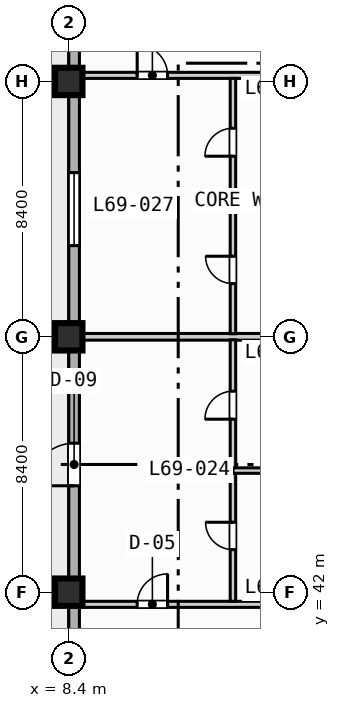
"""IFC4 building model, lengths in metres.
Left out: names, types, materials, properties, quantities, classifications, styles, units other than length and angle.
Written with IfcOpenShell. Run it as: python <this file> out.ifc"""

import sys

from ifc_helpers import new_model, si_unit, direction, frame, frame_2d, origin, origin_2d, place, context, subcontext, project, spatial, rectangle, extrude, element, fill, save


model = new_model("IFC4")
c1 = context("Model", 3, precision=1e-05, world=origin(), true_north=direction((0.0, 1.0)))
c2 = subcontext(c1, "Body", "Model", "MODEL_VIEW")
j1 = project(units=[si_unit("LENGTHUNIT", "METRE"), si_unit("PLANEANGLEUNIT", "RADIAN")], contexts=[c1])
p1 = place(None, origin())
s1 = spatial("IfcSite", under=j1, at=p1, CompositionType="ELEMENT")
p2 = place(p1, origin())
s2 = spatial("IfcBuilding", under=s1, at=p2, CompositionType="ELEMENT")
p3 = place(p2, frame((0.0, 0.0, 278.6)))
s3 = spatial("IfcBuildingStorey", under=s2, at=p3, CompositionType="ELEMENT", Elevation=278.6)
for number, where, z_axis, x_axis in (
    (1, (8.4, 42.0, 0.0), (0.0, 0.0, 1.0), (1.0, 0.0, 0.0)),
    (2, (8.4, 50.4, 0.0), (0.0, 0.0, 1.0), (1.0, 0.0, 0.0)),
    (3, (8.4, 58.8, 0.0), (0.0, 0.0, 1.0), (1.0, 0.0, 0.0)),
):
    element("IfcColumn", number, at=place(p3, frame(where, z_axis=z_axis, x_axis=x_axis)), inside=s3, PredefinedType="COLUMN", context=c2, shape_type="SweptSolid", body=[
        extrude(rectangle(XDim=0.9, YDim=0.9, at=origin_2d()), origin(), (0.0, 0.0, 1.0), 3.7),
    ])
p4 = place(p3, frame((8.575, 11.575, 0.0), z_axis=(0.0, 0.0, 1.0), x_axis=(0.0, 1.0, 0.0)))
e4 = element("IfcWall", 4, at=p4, inside=s3, PredefinedType="STANDARD", context=c2, shape_type="SweptSolid", body=[
    extrude(rectangle(XDim=60.85, YDim=0.35, at=frame_2d((30.425, 0.0))), origin(), (0.0, 0.0, 1.0), 3.47),
])
p5 = place(p4, frame((33.925, 0.0, 0.0)))
e5 = element("IfcOpeningElement", 5, at=p5, cuts=e4, PredefinedType="OPENING", context=c2, shape_type="SweptSolid", body=[
    extrude(rectangle(XDim=1.4, YDim=2.2, at=frame_2d((0.7, 1.1))), frame((0.0, 0.185, 0.0), z_axis=(0.0, -1.0, 0.0), x_axis=(1.0, 0.0, 0.0)), (0.0, 0.0, 1.0), 0.37),
])
p6 = place(p4, frame((16.925, 0.0, 0.85)))
e6 = element("IfcOpeningElement", 6, at=p6, cuts=e4, PredefinedType="OPENING", context=c2, shape_type="SweptSolid", body=[
    extrude(rectangle(XDim=1.8, YDim=1.8, at=frame_2d((0.9, 0.9))), frame((0.0, 0.185, 0.0), z_axis=(0.0, -1.0, 0.0), x_axis=(1.0, 0.0, 0.0)), (0.0, 0.0, 1.0), 0.37),
])
p7 = place(p4, frame((25.025, 0.0, 0.85)))
e7 = element("IfcOpeningElement", 7, at=p7, cuts=e4, PredefinedType="OPENING", context=c2, shape_type="SweptSolid", body=[
    extrude(rectangle(XDim=2.4, YDim=1.95, at=frame_2d((1.2, 0.975))), frame((0.0, 0.185, 0.0), z_axis=(0.0, -1.0, 0.0), x_axis=(1.0, 0.0, 0.0)), (0.0, 0.0, 1.0), 0.37),
])
p8 = place(p4, frame((41.825, 0.0, 0.85)))
e8 = element("IfcOpeningElement", 8, at=p8, cuts=e4, PredefinedType="OPENING", context=c2, shape_type="SweptSolid", body=[
    extrude(rectangle(XDim=2.4, YDim=1.95, at=frame_2d((1.2, 0.975))), frame((0.0, 0.185, 0.0), z_axis=(0.0, -1.0, 0.0), x_axis=(1.0, 0.0, 0.0)), (0.0, 0.0, 1.0), 0.37),
])
p9 = place(p3, frame((8.65, 41.6, 0.0), z_axis=(0.0, 0.0, 1.0), x_axis=(1.0, 0.0, 0.0)))
e9 = element("IfcWall", 9, at=p9, inside=s3, PredefinedType="PARTITIONING", context=c2, shape_type="SweptSolid", body=[
    extrude(rectangle(XDim=7.95, YDim=0.2, at=frame_2d((3.975, 0.0))), origin(), (0.0, 0.0, 1.0), 3.47),
])
p10 = place(p9, frame((2.0, 0.0, 0.0)))
e10 = element("IfcOpeningElement", 10, at=p10, cuts=e9, PredefinedType="OPENING", context=c2, shape_type="SweptSolid", body=[
    extrude(rectangle(XDim=1.0, YDim=2.15, at=frame_2d((0.5, 1.075))), frame((0.0, 0.11, 0.0), z_axis=(0.0, -1.0, 0.0), x_axis=(1.0, 0.0, 0.0)), (0.0, 0.0, 1.0), 0.22),
])
p11 = place(p3, frame((8.65, 59.0, 0.0), z_axis=(0.0, 0.0, 1.0), x_axis=(1.0, 0.0, 0.0)))
e11 = element("IfcWall", 11, at=p11, inside=s3, PredefinedType="PARTITIONING", context=c2, shape_type="SweptSolid", body=[
    extrude(rectangle(XDim=7.95, YDim=0.2, at=frame_2d((3.975, 0.0))), origin(), (0.0, 0.0, 1.0), 3.116),
])
p12 = place(p11, frame((2.0, 0.0, 0.0)))
e12 = element("IfcOpeningElement", 12, at=p12, cuts=e11, PredefinedType="OPENING", context=c2, shape_type="SweptSolid", body=[
    extrude(rectangle(XDim=1.0, YDim=2.15, at=frame_2d((0.5, 1.075))), frame((0.0, 0.11, 0.0), z_axis=(0.0, -1.0, 0.0), x_axis=(1.0, 0.0, 0.0)), (0.0, 0.0, 1.0), 0.22),
])
p13 = place(p3, frame((8.65, 50.4, 0.0), z_axis=(0.0, 0.0, 1.0), x_axis=(1.0, 0.0, 0.0)))
e13 = element("IfcWall", 13, at=p13, inside=s3, PredefinedType="PARTITIONING", context=c2, shape_type="SweptSolid", body=[
    extrude(rectangle(XDim=7.95, YDim=0.22, at=frame_2d((3.975, 0.0))), origin(), (0.0, 0.0, 1.0), 2.82),
])
p14 = place(p3, frame((13.8, 41.7, 0.0), z_axis=(0.0, 0.0, 1.0), x_axis=(0.0, 1.0, 0.0)))
e14 = element("IfcWall", 14, at=p14, inside=s3, PredefinedType="PLUMBINGWALL", context=c2, shape_type="SweptSolid", body=[
    extrude(rectangle(XDim=8.6, YDim=0.18, at=frame_2d((4.3, 0.0))), origin(), (0.0, 0.0, 1.0), 3.47),
])
p15 = place(p14, frame((1.7, 0.0, 0.0)))
e15 = element("IfcOpeningElement", 15, at=p15, cuts=e14, PredefinedType="OPENING", context=c2, shape_type="SweptSolid", body=[
    extrude(rectangle(XDim=0.9, YDim=2.1, at=frame_2d((0.45, 1.05))), frame((0.0, 0.1, 0.0), z_axis=(0.0, -1.0, 0.0), x_axis=(1.0, 0.0, 0.0)), (0.0, 0.0, 1.0), 0.2),
])
p16 = place(p14, frame((5.99, 0.0, 0.0)))
e16 = element("IfcOpeningElement", 16, at=p16, cuts=e14, PredefinedType="OPENING", context=c2, shape_type="SweptSolid", body=[
    extrude(rectangle(XDim=0.92, YDim=2.1, at=frame_2d((0.46, 1.05))), frame((0.0, 0.1, 0.0), z_axis=(0.0, -1.0, 0.0), x_axis=(1.0, 0.0, 0.0)), (0.0, 0.0, 1.0), 0.2),
])
p17 = place(p3, frame((13.8, 46.0, 0.0), z_axis=(0.0, 0.0, 1.0), x_axis=(1.0, 0.0, 0.0)))
e17 = element("IfcWall", 17, at=p17, inside=s3, PredefinedType="PLUMBINGWALL", context=c2, shape_type="SweptSolid", body=[
    extrude(rectangle(XDim=2.8, YDim=0.18, at=frame_2d((1.4, 0.0))), origin(), (0.0, 0.0, 1.0), 3.47),
])
p18 = place(p3, frame((13.8, 50.5, 0.0), z_axis=(0.0, 0.0, 1.0), x_axis=(0.0, 1.0, 0.0)))
e18 = element("IfcWall", 18, at=p18, inside=s3, PredefinedType="PLUMBINGWALL", context=c2, shape_type="SweptSolid", body=[
    extrude(rectangle(XDim=8.4, YDim=0.18, at=frame_2d((4.2, 0.0))), origin(), (0.0, 0.0, 1.0), 3.47),
])
p19 = place(p18, frame((1.65, 0.0, 0.0)))
e19 = element("IfcOpeningElement", 19, at=p19, cuts=e18, PredefinedType="OPENING", context=c2, shape_type="SweptSolid", body=[
    extrude(rectangle(XDim=0.9, YDim=2.1, at=frame_2d((0.45, 1.05))), frame((0.0, 0.1, 0.0), z_axis=(0.0, -1.0, 0.0), x_axis=(1.0, 0.0, 0.0)), (0.0, 0.0, 1.0), 0.2),
])
p20 = place(p18, frame((5.84, 0.0, 0.0)))
e20 = element("IfcOpeningElement", 20, at=p20, cuts=e18, PredefinedType="OPENING", context=c2, shape_type="SweptSolid", body=[
    extrude(rectangle(XDim=0.92, YDim=2.1, at=frame_2d((0.46, 1.05))), frame((0.0, 0.1, 0.0), z_axis=(0.0, -1.0, 0.0), x_axis=(1.0, 0.0, 0.0)), (0.0, 0.0, 1.0), 0.2),
])
p21 = place(p3, frame((13.8, 54.7, 0.0), z_axis=(0.0, 0.0, 1.0), x_axis=(1.0, 0.0, 0.0)))
e21 = element("IfcWall", 21, at=p21, inside=s3, PredefinedType="PLUMBINGWALL", context=c2, shape_type="SweptSolid", body=[
    extrude(rectangle(XDim=2.8, YDim=0.18, at=frame_2d((1.4, 0.0))), origin(), (0.0, 0.0, 1.0), 3.47),
])
p22 = place(p5, origin())
e22 = element("IfcDoor", 22, at=p22, inside=s3, OperationType="SINGLE_SWING_LEFT", PredefinedType="DOOR", context=c2, shape_type="SweptSolid", body=[
    extrude(rectangle(XDim=1.4, YDim=2.2, at=frame_2d((0.7, 1.1))), frame((0.0, 0.025, 0.0), z_axis=(0.0, -1.0, 0.0), x_axis=(1.0, 0.0, 0.0)), (0.0, 0.0, 1.0), 0.05),
])
fill(e5, e22)
p23 = place(p8, origin())
e23 = element("IfcWindow", 23, at=p23, inside=s3, PartitioningType="SINGLE_PANEL", PredefinedType="WINDOW", context=c2, shape_type="SweptSolid", body=[
    extrude(rectangle(XDim=2.4, YDim=1.95, at=frame_2d((1.2, 0.975))), frame((0.0, 0.03, 0.0), z_axis=(0.0, -1.0, 0.0), x_axis=(1.0, 0.0, 0.0)), (0.0, 0.0, 1.0), 0.06),
])
fill(e8, e23)
p24 = place(p10, origin())
e24 = element("IfcDoor", 24, at=p24, inside=s3, OperationType="SINGLE_SWING_RIGHT", PredefinedType="DOOR", context=c2, shape_type="SweptSolid", body=[
    extrude(rectangle(XDim=1.0, YDim=2.15, at=frame_2d((0.5, 1.075))), frame((0.0, 0.025, 0.0), z_axis=(0.0, -1.0, 0.0), x_axis=(1.0, 0.0, 0.0)), (0.0, 0.0, 1.0), 0.05),
])
fill(e10, e24)
p25 = place(p12, origin())
e25 = element("IfcDoor", 25, at=p25, inside=s3, OperationType="SINGLE_SWING_LEFT", PredefinedType="DOOR", context=c2, shape_type="SweptSolid", body=[
    extrude(rectangle(XDim=1.0, YDim=2.15, at=frame_2d((0.5, 1.075))), frame((0.0, 0.025, 0.0), z_axis=(0.0, -1.0, 0.0), x_axis=(1.0, 0.0, 0.0)), (0.0, 0.0, 1.0), 0.05),
])
fill(e12, e25)
p26 = place(p15, origin())
e26 = element("IfcDoor", 26, at=p26, inside=s3, OperationType="SINGLE_SWING_RIGHT", PredefinedType="DOOR", context=c2, shape_type="SweptSolid", body=[
    extrude(rectangle(XDim=0.9, YDim=2.1, at=frame_2d((0.45, 1.05))), frame((0.0, 0.025, 0.0), z_axis=(0.0, -1.0, 0.0), x_axis=(1.0, 0.0, 0.0)), (0.0, 0.0, 1.0), 0.05),
])
fill(e15, e26)
p27 = place(p16, origin())
e27 = element("IfcDoor", 27, at=p27, inside=s3, OperationType="SINGLE_SWING_LEFT", PredefinedType="DOOR", context=c2, shape_type="SweptSolid", body=[
    extrude(rectangle(XDim=0.92, YDim=2.1, at=frame_2d((0.46, 1.05))), frame((0.0, 0.025, 0.0), z_axis=(0.0, -1.0, 0.0), x_axis=(1.0, 0.0, 0.0)), (0.0, 0.0, 1.0), 0.05),
])
fill(e16, e27)
p28 = place(p19, origin())
e28 = element("IfcDoor", 28, at=p28, inside=s3, OperationType="SINGLE_SWING_RIGHT", PredefinedType="DOOR", context=c2, shape_type="SweptSolid", body=[
    extrude(rectangle(XDim=0.9, YDim=2.1, at=frame_2d((0.45, 1.05))), frame((0.0, 0.025, 0.0), z_axis=(0.0, -1.0, 0.0), x_axis=(1.0, 0.0, 0.0)), (0.0, 0.0, 1.0), 0.05),
])
fill(e19, e28)
p29 = place(p20, origin())
e29 = element("IfcDoor", 29, at=p29, inside=s3, OperationType="SINGLE_SWING_LEFT", PredefinedType="DOOR", context=c2, shape_type="SweptSolid", body=[
    extrude(rectangle(XDim=0.92, YDim=2.1, at=frame_2d((0.46, 1.05))), frame((0.0, 0.025, 0.0), z_axis=(0.0, -1.0, 0.0), x_axis=(1.0, 0.0, 0.0)), (0.0, 0.0, 1.0), 0.05),
])
fill(e20, e29)
save(model, sys.argv[1])
